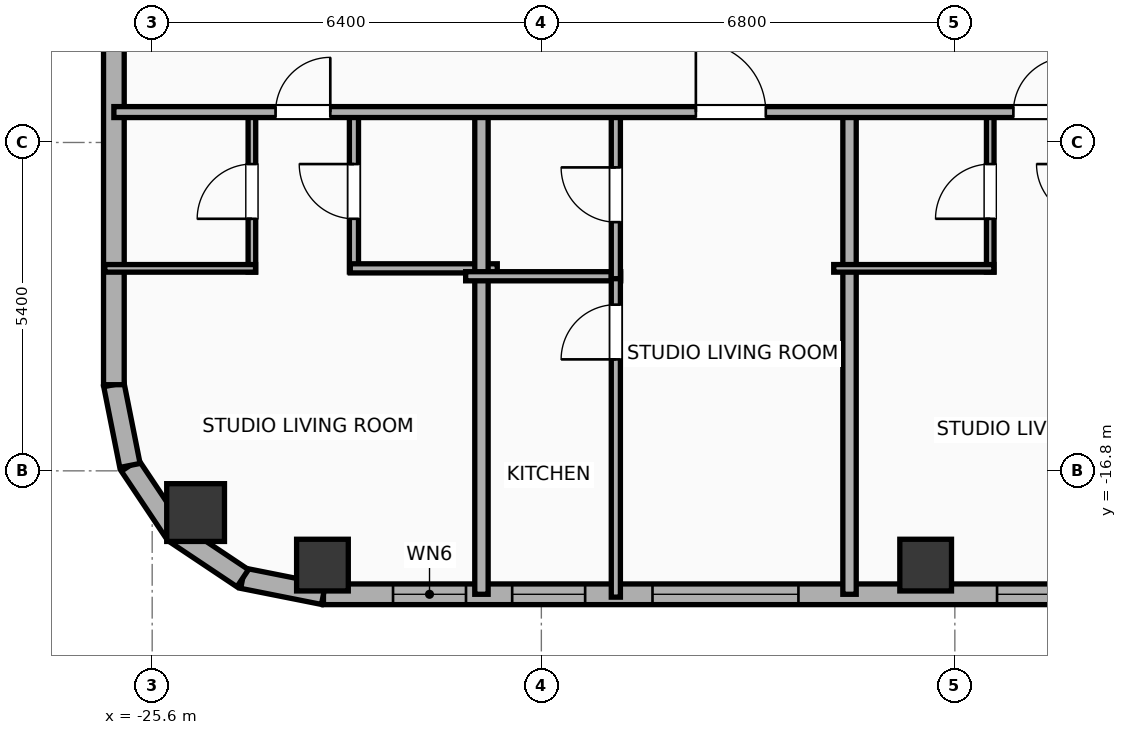
"""IFC4 building model, lengths in metres.
Left out: names, types, materials, properties, quantities, classifications, styles, units other than length and angle.
Written with IfcOpenShell. Run it as: python <this file> out.ifc"""

import sys

from ifc_helpers import new_model, si_unit, direction, frame, frame_2d, origin, origin_2d, place, context, subcontext, project, spatial, rectangle, hollow_rectangle, hollow_circle, extrude, element, fill, save


model = new_model("IFC4")
c1 = context("Model", 3, precision=1e-05, world=origin(), true_north=direction((0.0, 1.0)))
c2 = subcontext(c1, "Body", "Model", "MODEL_VIEW")
j1 = project(units=[si_unit("LENGTHUNIT", "METRE"), si_unit("PLANEANGLEUNIT", "RADIAN")], contexts=[c1])
p1 = place(None, origin())
s1 = spatial("IfcSite", under=j1, at=p1, CompositionType="ELEMENT")
p2 = place(p1, origin())
s2 = spatial("IfcBuilding", under=s1, at=p2, CompositionType="ELEMENT")
p3 = place(p2, frame((0.0, 0.0, 243.1)))
s3 = spatial("IfcBuildingStorey", under=s2, at=p3, CompositionType="ELEMENT", Elevation=243.1)
for number, where, z_axis, x_axis in (
    (1, (-22.8, -18.35, 0.0), (0.0, 0.0, 1.0), (1.0, 0.0, 0.0)),
    (2, (-12.88, -18.35, 0.0), (0.0, 0.0, 1.0), (1.0, 0.0, 0.0)),
):
    element("IfcColumn", number, at=place(p3, frame(where, z_axis=z_axis, x_axis=x_axis)), inside=s3, PredefinedType="COLUMN", context=c2, shape_type="SweptSolid", body=[
        extrude(hollow_rectangle(XDim=0.85, YDim=0.85, WallThickness=0.028, at=origin_2d()), origin(), (0.0, 0.0, 1.0), 3.9),
    ])
p4 = place(p3, frame((-24.886, -17.486, 0.0), z_axis=(0.0, 0.0, 1.0), x_axis=(1.0, 0.0, 0.0)))
e3 = element("IfcColumn", 3, at=p4, inside=s3, PredefinedType="COLUMN", context=c2, shape_type="SweptSolid", body=[
    extrude(hollow_circle(Radius=0.475, WallThickness=0.032, at=origin_2d()), origin(), (0.0, 0.0, 1.0), 3.9),
])
p5 = place(p3, frame((26.783, -18.83, 0.0), z_axis=(0.0, 0.0, 1.0), x_axis=(-1.0, 0.0, 0.0)))
e4 = element("IfcWall", 4, at=p5, inside=s3, PredefinedType="ELEMENTEDWALL", context=c2, shape_type="SweptSolid", body=[
    extrude(rectangle(XDim=49.566, YDim=0.34, at=frame_2d((24.783, 0.0))), origin(), (0.0, 0.0, 1.0), 3.65),
])
p6 = place(p5, frame((23.583, 0.0, 0.75)))
e5 = element("IfcOpeningElement", 5, at=p6, cuts=e4, PredefinedType="OPENING", context=c2, shape_type="SweptSolid", body=[
    extrude(rectangle(XDim=2.4, YDim=2.1, at=frame_2d((1.2, 1.05))), frame((0.0, 0.18, 0.0), z_axis=(0.0, -1.0, 0.0), x_axis=(1.0, 0.0, 0.0)), (0.0, 0.0, 1.0), 0.36),
])
p7 = place(p5, frame((41.756, 0.0, 0.75)))
e6 = element("IfcOpeningElement", 6, at=p7, cuts=e4, PredefinedType="OPENING", context=c2, shape_type="SweptSolid", body=[
    extrude(rectangle(XDim=2.4, YDim=2.1, at=frame_2d((1.2, 1.05))), frame((0.0, 0.18, 0.0), z_axis=(0.0, -1.0, 0.0), x_axis=(1.0, 0.0, 0.0)), (0.0, 0.0, 1.0), 0.36),
])
p8 = place(p5, frame((47.222, 0.0, 0.75)))
e7 = element("IfcOpeningElement", 7, at=p8, cuts=e4, PredefinedType="OPENING", context=c2, shape_type="SweptSolid", body=[
    extrude(rectangle(XDim=1.2, YDim=2.05, at=frame_2d((0.6, 1.025))), frame((0.0, 0.18, 0.0), z_axis=(0.0, -1.0, 0.0), x_axis=(1.0, 0.0, 0.0)), (0.0, 0.0, 1.0), 0.36),
])
p9 = place(p5, frame((45.263, 0.0, 0.75)))
e8 = element("IfcOpeningElement", 8, at=p9, cuts=e4, PredefinedType="OPENING", context=c2, shape_type="SweptSolid", body=[
    extrude(rectangle(XDim=1.2, YDim=2.05, at=frame_2d((0.6, 1.025))), frame((0.0, 0.18, 0.0), z_axis=(0.0, -1.0, 0.0), x_axis=(1.0, 0.0, 0.0)), (0.0, 0.0, 1.0), 0.36),
])
p10 = place(p5, frame((37.289, 0.0, 0.75)))
e9 = element("IfcOpeningElement", 9, at=p10, cuts=e4, PredefinedType="OPENING", context=c2, shape_type="SweptSolid", body=[
    extrude(rectangle(XDim=1.2, YDim=2.05, at=frame_2d((0.6, 1.025))), frame((0.0, 0.18, 0.0), z_axis=(0.0, -1.0, 0.0), x_axis=(1.0, 0.0, 0.0)), (0.0, 0.0, 1.0), 0.36),
])
p11 = place(p5, frame((16.115, 0.0, 0.75)))
e10 = element("IfcOpeningElement", 10, at=p11, cuts=e4, PredefinedType="OPENING", context=c2, shape_type="SweptSolid", body=[
    extrude(rectangle(XDim=1.2, YDim=2.05, at=frame_2d((0.6, 1.025))), frame((0.0, 0.18, 0.0), z_axis=(0.0, -1.0, 0.0), x_axis=(1.0, 0.0, 0.0)), (0.0, 0.0, 1.0), 0.36),
])
p12 = place(p5, frame((12.422, 0.0, 0.75)))
e11 = element("IfcOpeningElement", 11, at=p12, cuts=e4, PredefinedType="OPENING", context=c2, shape_type="SweptSolid", body=[
    extrude(rectangle(XDim=1.2, YDim=2.05, at=frame_2d((0.6, 1.025))), frame((0.0, 0.18, 0.0), z_axis=(0.0, -1.0, 0.0), x_axis=(1.0, 0.0, 0.0)), (0.0, 0.0, 1.0), 0.36),
])
p13 = place(p5, frame((8.01, 0.0, 0.75)))
e12 = element("IfcOpeningElement", 12, at=p13, cuts=e4, PredefinedType="OPENING", context=c2, shape_type="SweptSolid", body=[
    extrude(rectangle(XDim=1.2, YDim=2.05, at=frame_2d((0.6, 1.025))), frame((0.0, 0.18, 0.0), z_axis=(0.0, -1.0, 0.0), x_axis=(1.0, 0.0, 0.0)), (0.0, 0.0, 1.0), 0.36),
])
p14 = place(p5, frame((5.037, 0.0, 0.75)))
e13 = element("IfcOpeningElement", 13, at=p14, cuts=e4, PredefinedType="OPENING", context=c2, shape_type="SweptSolid", body=[
    extrude(rectangle(XDim=1.2, YDim=2.05, at=frame_2d((0.6, 1.025))), frame((0.0, 0.18, 0.0), z_axis=(0.0, -1.0, 0.0), x_axis=(1.0, 0.0, 0.0)), (0.0, 0.0, 1.0), 0.36),
])
p15 = place(p5, frame((1.811, 0.0, 0.75)))
e14 = element("IfcOpeningElement", 14, at=p15, cuts=e4, PredefinedType="OPENING", context=c2, shape_type="SweptSolid", body=[
    extrude(rectangle(XDim=1.2, YDim=2.05, at=frame_2d((0.6, 1.025))), frame((0.0, 0.18, 0.0), z_axis=(0.0, -1.0, 0.0), x_axis=(1.0, 0.0, 0.0)), (0.0, 0.0, 1.0), 0.36),
])
p16 = place(p5, frame((32.253, 0.0, 0.75)))
e15 = element("IfcOpeningElement", 15, at=p16, cuts=e4, PredefinedType="OPENING", context=c2, shape_type="SweptSolid", body=[
    extrude(rectangle(XDim=1.2, YDim=2.05, at=frame_2d((0.6, 1.025))), frame((0.0, 0.18, 0.0), z_axis=(0.0, -1.0, 0.0), x_axis=(1.0, 0.0, 0.0)), (0.0, 0.0, 1.0), 0.36),
])
p17 = place(p5, frame((27.853, 0.0, 0.75)))
e16 = element("IfcOpeningElement", 16, at=p17, cuts=e4, PredefinedType="OPENING", context=c2, shape_type="SweptSolid", body=[
    extrude(rectangle(XDim=1.2, YDim=2.05, at=frame_2d((0.6, 1.025))), frame((0.0, 0.18, 0.0), z_axis=(0.0, -1.0, 0.0), x_axis=(1.0, 0.0, 0.0)), (0.0, 0.0, 1.0), 0.36),
])
p18 = place(p5, frame((20.473, 0.0, 0.75)))
e17 = element("IfcOpeningElement", 17, at=p18, cuts=e4, PredefinedType="OPENING", context=c2, shape_type="SweptSolid", body=[
    extrude(rectangle(XDim=1.2, YDim=2.05, at=frame_2d((0.6, 1.025))), frame((0.0, 0.18, 0.0), z_axis=(0.0, -1.0, 0.0), x_axis=(1.0, 0.0, 0.0)), (0.0, 0.0, 1.0), 0.36),
])
p19 = place(p3, frame((-22.783, -18.83, 0.0), z_axis=(0.0, 0.0, 1.0), x_axis=(-0.980788153188, 0.195075878998, 0.0)))
e18 = element("IfcWall", 18, at=p19, inside=s3, PredefinedType="ELEMENTEDWALL", context=c2, shape_type="SweptSolid", body=[
    extrude(rectangle(XDim=1.354, YDim=0.34, at=frame_2d((0.677, 0.0))), origin(), (0.0, 0.0, 1.0), 3.65),
])
p20 = place(p3, frame((-24.111, -18.566, 0.0), z_axis=(0.0, 0.0, 1.0), x_axis=(-0.831403586725, 0.555669034571, 0.0)))
e19 = element("IfcWall", 19, at=p20, inside=s3, PredefinedType="ELEMENTEDWALL", context=c2, shape_type="SweptSolid", body=[
    extrude(rectangle(XDim=1.337, YDim=0.34, at=frame_2d((0.668, 0.0))), origin(), (0.0, 0.0, 1.0), 3.65),
])
p21 = place(p3, frame((-25.223, -17.823, 0.0), z_axis=(0.0, 0.0, 1.0), x_axis=(-0.555584683399, 0.831459956686, 0.0)))
e20 = element("IfcWall", 20, at=p21, inside=s3, PredefinedType="ELEMENTEDWALL", context=c2, shape_type="SweptSolid", body=[
    extrude(rectangle(XDim=1.337, YDim=0.34, at=frame_2d((0.668, 0.0))), origin(), (0.0, 0.0, 1.0), 3.65),
])
p22 = place(p3, frame((-25.966, -16.711, 0.0), z_axis=(0.0, 0.0, 1.0), x_axis=(-0.195110379894, 0.98078129043, 0.0)))
e21 = element("IfcWall", 21, at=p22, inside=s3, PredefinedType="ELEMENTEDWALL", context=c2, shape_type="SweptSolid", body=[
    extrude(rectangle(XDim=1.354, YDim=0.34, at=frame_2d((0.677, 0.0))), origin(), (0.0, 0.0, 1.0), 3.65),
])
p23 = place(p3, frame((-26.23, -15.383, 0.0), z_axis=(0.0, 0.0, 1.0), x_axis=(0.0, 1.0, 0.0)))
e22 = element("IfcWall", 22, at=p23, inside=s3, PredefinedType="ELEMENTEDWALL", context=c2, shape_type="SweptSolid", body=[
    extrude(rectangle(XDim=31.967, YDim=0.34, at=frame_2d((15.983, 0.0))), origin(), (0.0, 0.0, 1.0), 3.65),
])
p24 = place(p23, frame((29.36, 0.0, 0.75)))
e23 = element("IfcOpeningElement", 23, at=p24, cuts=e22, PredefinedType="OPENING", context=c2, shape_type="SweptSolid", body=[
    extrude(rectangle(XDim=1.2, YDim=2.05, at=frame_2d((0.6, 1.025))), frame((0.0, 0.18, 0.0), z_axis=(0.0, -1.0, 0.0), x_axis=(1.0, 0.0, 0.0)), (0.0, 0.0, 1.0), 0.36),
])
p25 = place(p23, frame((20.828, 0.0, 0.75)))
e24 = element("IfcOpeningElement", 24, at=p25, cuts=e22, PredefinedType="OPENING", context=c2, shape_type="SweptSolid", body=[
    extrude(rectangle(XDim=1.2, YDim=2.05, at=frame_2d((0.6, 1.025))), frame((0.0, 0.18, 0.0), z_axis=(0.0, -1.0, 0.0), x_axis=(1.0, 0.0, 0.0)), (0.0, 0.0, 1.0), 0.36),
])
p26 = place(p23, frame((7.273, 0.0, 0.75)))
e25 = element("IfcOpeningElement", 25, at=p26, cuts=e22, PredefinedType="OPENING", context=c2, shape_type="SweptSolid", body=[
    extrude(rectangle(XDim=1.2, YDim=2.05, at=frame_2d((0.6, 1.025))), frame((0.0, 0.18, 0.0), z_axis=(0.0, -1.0, 0.0), x_axis=(1.0, 0.0, 0.0)), (0.0, 0.0, 1.0), 0.36),
])
p27 = place(p3, frame((-23.96, -13.53, 0.0), z_axis=(0.0, 0.0, 1.0), x_axis=(0.0, 1.0, 0.0)))
e26 = element("IfcWall", 26, at=p27, inside=s3, PredefinedType="PARTITIONING", context=c2, shape_type="SweptSolid", body=[
    extrude(rectangle(XDim=2.65, YDim=0.125, at=frame_2d((1.325, 0.0))), origin(), (0.0, 0.0, 1.0), 3.65),
])
p28 = place(p27, frame((0.875, 0.0, 0.0)))
e27 = element("IfcOpeningElement", 27, at=p28, cuts=e26, PredefinedType="OPENING", context=c2, shape_type="SweptSolid", body=[
    extrude(rectangle(XDim=0.9, YDim=2.05, at=frame_2d((0.45, 1.025))), frame((0.0, 0.073, 0.0), z_axis=(0.0, -1.0, 0.0), x_axis=(1.0, 0.0, 0.0)), (0.0, 0.0, 1.0), 0.145),
])
p29 = place(p3, frame((-22.282, -13.53, 0.0), z_axis=(0.0, 0.0, 1.0), x_axis=(0.0, 1.0, 0.0)))
e28 = element("IfcWall", 28, at=p29, inside=s3, PredefinedType="PLUMBINGWALL", context=c2, shape_type="SweptSolid", body=[
    extrude(rectangle(XDim=2.65, YDim=0.15, at=frame_2d((1.325, 0.0))), origin(), (0.0, 0.0, 1.0), 3.65),
])
p30 = place(p29, frame((0.875, 0.0, 0.0)))
e29 = element("IfcOpeningElement", 29, at=p30, cuts=e28, PredefinedType="OPENING", context=c2, shape_type="SweptSolid", body=[
    extrude(rectangle(XDim=0.9, YDim=2.05, at=frame_2d((0.45, 1.025))), frame((0.0, 0.085, 0.0), z_axis=(0.0, -1.0, 0.0), x_axis=(1.0, 0.0, 0.0)), (0.0, 0.0, 1.0), 0.17),
])
p31 = place(p3, frame((-26.38, -13.47, 0.0), z_axis=(0.0, 0.0, 1.0), x_axis=(1.0, 0.0, 0.0)))
e30 = element("IfcWall", 30, at=p31, inside=s3, PredefinedType="PARTITIONING", context=c2, shape_type="SweptSolid", body=[
    extrude(rectangle(XDim=2.48, YDim=0.125, at=frame_2d((1.24, 0.0))), origin(), (0.0, 0.0, 1.0), 3.65),
])
p32 = place(p3, frame((-22.342, -13.47, 0.0), z_axis=(0.0, 0.0, 1.0), x_axis=(1.0, 0.0, 0.0)))
e31 = element("IfcWall", 31, at=p32, inside=s3, PredefinedType="PLUMBINGWALL", context=c2, shape_type="SweptSolid", body=[
    extrude(rectangle(XDim=2.417, YDim=0.15, at=frame_2d((1.208, 0.0))), origin(), (0.0, 0.0, 1.0), 3.65),
])
p33 = place(p3, frame((-20.185, -18.83, 0.0), z_axis=(0.0, 0.0, 1.0), x_axis=(0.0, 1.0, 0.0)))
e32 = element("IfcWall", 32, at=p33, inside=s3, PredefinedType="PARTITIONING", context=c2, shape_type="SweptSolid", body=[
    extrude(rectangle(XDim=8.01, YDim=0.22, at=frame_2d((4.005, 0.0))), origin(), (0.0, 0.0, 1.0), 3.65),
])
p34 = place(p3, frame((-20.445, -13.6, 0.0), z_axis=(0.0, 0.0, 1.0), x_axis=(1.0, 0.0, 0.0)))
e33 = element("IfcWall", 33, at=p34, inside=s3, PredefinedType="PLUMBINGWALL", context=c2, shape_type="SweptSolid", body=[
    extrude(rectangle(XDim=2.55, YDim=0.15, at=frame_2d((1.275, 0.0))), origin(), (0.0, 0.0, 1.0), 3.65),
])
p35 = place(p3, frame((-17.975, -18.877, 0.0), z_axis=(0.0, 0.0, 1.0), x_axis=(0.0, 1.0, 0.0)))
e34 = element("IfcWall", 34, at=p35, inside=s3, PredefinedType="PLUMBINGWALL", context=c2, shape_type="SweptSolid", body=[
    extrude(rectangle(XDim=5.317, YDim=0.15, at=frame_2d((2.658, 0.0))), origin(), (0.0, 0.0, 1.0), 3.65),
])
p36 = place(p35, frame((3.91, 0.0, 0.0)))
e35 = element("IfcOpeningElement", 35, at=p36, cuts=e34, PredefinedType="OPENING", context=c2, shape_type="SweptSolid", body=[
    extrude(rectangle(XDim=0.9, YDim=2.05, at=frame_2d((0.45, 1.025))), frame((0.0, 0.085, 0.0), z_axis=(0.0, -1.0, 0.0), x_axis=(1.0, 0.0, 0.0)), (0.0, 0.0, 1.0), 0.17),
])
p37 = place(p3, frame((-17.975, -13.64, 0.0), z_axis=(0.0, 0.0, 1.0), x_axis=(0.0, 1.0, 0.0)))
e36 = element("IfcWall", 36, at=p37, inside=s3, PredefinedType="PLUMBINGWALL", context=c2, shape_type="SweptSolid", body=[
    extrude(rectangle(XDim=2.76, YDim=0.15, at=frame_2d((1.38, 0.0))), origin(), (0.0, 0.0, 1.0), 3.65),
])
p38 = place(p37, frame((0.93, 0.0, 0.0)))
e37 = element("IfcOpeningElement", 37, at=p38, cuts=e36, PredefinedType="OPENING", context=c2, shape_type="SweptSolid", body=[
    extrude(rectangle(XDim=0.9, YDim=2.05, at=frame_2d((0.45, 1.025))), frame((0.0, 0.085, 0.0), z_axis=(0.0, -1.0, 0.0), x_axis=(1.0, 0.0, 0.0)), (0.0, 0.0, 1.0), 0.17),
])
p39 = place(p3, frame((-14.132, -18.83, 0.0), z_axis=(0.0, 0.0, 1.0), x_axis=(0.0, 1.0, 0.0)))
e38 = element("IfcWall", 38, at=p39, inside=s3, PredefinedType="PARTITIONING", context=c2, shape_type="SweptSolid", body=[
    extrude(rectangle(XDim=8.01, YDim=0.22, at=frame_2d((4.005, 0.0))), origin(), (0.0, 0.0, 1.0), 3.65),
])
p40 = place(p3, frame((-11.818, -13.53, 0.0), z_axis=(0.0, 0.0, 1.0), x_axis=(0.0, 1.0, 0.0)))
e39 = element("IfcWall", 39, at=p40, inside=s3, PredefinedType="PARTITIONING", context=c2, shape_type="SweptSolid", body=[
    extrude(rectangle(XDim=2.65, YDim=0.125, at=frame_2d((1.325, 0.0))), origin(), (0.0, 0.0, 1.0), 3.65),
])
p41 = place(p40, frame((0.875, 0.0, 0.0)))
e40 = element("IfcOpeningElement", 40, at=p41, cuts=e39, PredefinedType="OPENING", context=c2, shape_type="SweptSolid", body=[
    extrude(rectangle(XDim=0.9, YDim=2.05, at=frame_2d((0.45, 1.025))), frame((0.0, 0.073, 0.0), z_axis=(0.0, -1.0, 0.0), x_axis=(1.0, 0.0, 0.0)), (0.0, 0.0, 1.0), 0.145),
])
p42 = place(p3, frame((-14.392, -13.47, 0.0), z_axis=(0.0, 0.0, 1.0), x_axis=(1.0, 0.0, 0.0)))
e41 = element("IfcWall", 41, at=p42, inside=s3, PredefinedType="PARTITIONING", context=c2, shape_type="SweptSolid", body=[
    extrude(rectangle(XDim=2.634, YDim=0.125, at=frame_2d((1.317, 0.0))), origin(), (0.0, 0.0, 1.0), 3.65),
])
p43 = place(p3, frame((-26.23, -10.9, 0.0), z_axis=(0.0, 0.0, 1.0), x_axis=(1.0, 0.0, 0.0)))
e42 = element("IfcWall", 42, at=p43, inside=s3, PredefinedType="PARTITIONING", context=c2, shape_type="SweptSolid", body=[
    extrude(rectangle(XDim=18.15, YDim=0.18, at=frame_2d((9.075, 0.0))), origin(), (0.0, 0.0, 1.0), 3.65),
])
p44 = place(p43, frame((2.659, 0.0, 0.0)))
e43 = element("IfcOpeningElement", 43, at=p44, cuts=e42, PredefinedType="OPENING", context=c2, shape_type="SweptSolid", body=[
    extrude(rectangle(XDim=0.9, YDim=2.05, at=frame_2d((0.45, 1.025))), frame((0.0, 0.1, 0.0), z_axis=(0.0, -1.0, 0.0), x_axis=(1.0, 0.0, 0.0)), (0.0, 0.0, 1.0), 0.2),
])
p45 = place(p43, frame((9.571, 0.0, 0.0)))
e44 = element("IfcOpeningElement", 44, at=p45, cuts=e42, PredefinedType="OPENING", context=c2, shape_type="SweptSolid", body=[
    extrude(rectangle(XDim=1.15, YDim=2.05, at=frame_2d((0.575, 1.025))), frame((0.0, 0.1, 0.0), z_axis=(0.0, -1.0, 0.0), x_axis=(1.0, 0.0, 0.0)), (0.0, 0.0, 1.0), 0.2),
])
p46 = place(p43, frame((14.792, 0.0, 0.0)))
e45 = element("IfcOpeningElement", 45, at=p46, cuts=e42, PredefinedType="OPENING", context=c2, shape_type="SweptSolid", body=[
    extrude(rectangle(XDim=0.9, YDim=2.05, at=frame_2d((0.45, 1.025))), frame((0.0, 0.1, 0.0), z_axis=(0.0, -1.0, 0.0), x_axis=(1.0, 0.0, 0.0)), (0.0, 0.0, 1.0), 0.2),
])
p47 = place(p7, origin())
e46 = element("IfcWindow", 46, at=p47, inside=s3, PartitioningType="SINGLE_PANEL", PredefinedType="WINDOW", context=c2, shape_type="SweptSolid", body=[
    extrude(rectangle(XDim=2.4, YDim=2.1, at=frame_2d((1.2, 1.05))), frame((0.0, 0.03, 0.0), z_axis=(0.0, -1.0, 0.0), x_axis=(1.0, 0.0, 0.0)), (0.0, 0.0, 1.0), 0.06),
])
fill(e6, e46)
p48 = place(p8, origin())
e47 = element("IfcWindow", 47, at=p48, inside=s3, PartitioningType="SINGLE_PANEL", PredefinedType="WINDOW", context=c2, shape_type="SweptSolid", body=[
    extrude(rectangle(XDim=1.2, YDim=2.05, at=frame_2d((0.6, 1.025))), frame((0.0, 0.03, 0.0), z_axis=(0.0, -1.0, 0.0), x_axis=(1.0, 0.0, 0.0)), (0.0, 0.0, 1.0), 0.06),
])
fill(e7, e47)
p49 = place(p9, origin())
e48 = element("IfcWindow", 48, at=p49, inside=s3, PartitioningType="SINGLE_PANEL", PredefinedType="WINDOW", context=c2, shape_type="SweptSolid", body=[
    extrude(rectangle(XDim=1.2, YDim=2.05, at=frame_2d((0.6, 1.025))), frame((0.0, 0.03, 0.0), z_axis=(0.0, -1.0, 0.0), x_axis=(1.0, 0.0, 0.0)), (0.0, 0.0, 1.0), 0.06),
])
fill(e8, e48)
p50 = place(p10, origin())
e49 = element("IfcWindow", 49, at=p50, inside=s3, PartitioningType="SINGLE_PANEL", PredefinedType="WINDOW", context=c2, shape_type="SweptSolid", body=[
    extrude(rectangle(XDim=1.2, YDim=2.05, at=frame_2d((0.6, 1.025))), frame((0.0, 0.03, 0.0), z_axis=(0.0, -1.0, 0.0), x_axis=(1.0, 0.0, 0.0)), (0.0, 0.0, 1.0), 0.06),
])
fill(e9, e49)
p51 = place(p28, origin())
e50 = element("IfcDoor", 50, at=p51, inside=s3, OperationType="SINGLE_SWING_LEFT", PredefinedType="DOOR", context=c2, shape_type="SweptSolid", body=[
    extrude(rectangle(XDim=0.9, YDim=2.05, at=frame_2d((0.45, 1.025))), frame((0.0, 0.025, 0.0), z_axis=(0.0, -1.0, 0.0), x_axis=(1.0, 0.0, 0.0)), (0.0, 0.0, 1.0), 0.05),
])
fill(e27, e50)
p52 = place(p30, origin())
e51 = element("IfcDoor", 51, at=p52, inside=s3, OperationType="SINGLE_SWING_RIGHT", PredefinedType="DOOR", context=c2, shape_type="SweptSolid", body=[
    extrude(rectangle(XDim=0.9, YDim=2.05, at=frame_2d((0.45, 1.025))), frame((0.0, 0.025, 0.0), z_axis=(0.0, -1.0, 0.0), x_axis=(1.0, 0.0, 0.0)), (0.0, 0.0, 1.0), 0.05),
])
fill(e29, e51)
p53 = place(p36, origin())
e52 = element("IfcDoor", 52, at=p53, inside=s3, OperationType="SINGLE_SWING_LEFT", PredefinedType="DOOR", context=c2, shape_type="SweptSolid", body=[
    extrude(rectangle(XDim=0.9, YDim=2.05, at=frame_2d((0.45, 1.025))), frame((0.0, 0.025, 0.0), z_axis=(0.0, -1.0, 0.0), x_axis=(1.0, 0.0, 0.0)), (0.0, 0.0, 1.0), 0.05),
])
fill(e35, e52)
p54 = place(p38, origin())
e53 = element("IfcDoor", 53, at=p54, inside=s3, OperationType="SINGLE_SWING_RIGHT", PredefinedType="DOOR", context=c2, shape_type="SweptSolid", body=[
    extrude(rectangle(XDim=0.9, YDim=2.05, at=frame_2d((0.45, 1.025))), frame((0.0, 0.025, 0.0), z_axis=(0.0, -1.0, 0.0), x_axis=(1.0, 0.0, 0.0)), (0.0, 0.0, 1.0), 0.05),
])
fill(e37, e53)
p55 = place(p41, origin())
e54 = element("IfcDoor", 54, at=p55, inside=s3, OperationType="SINGLE_SWING_LEFT", PredefinedType="DOOR", context=c2, shape_type="SweptSolid", body=[
    extrude(rectangle(XDim=0.9, YDim=2.05, at=frame_2d((0.45, 1.025))), frame((0.0, 0.025, 0.0), z_axis=(0.0, -1.0, 0.0), x_axis=(1.0, 0.0, 0.0)), (0.0, 0.0, 1.0), 0.05),
])
fill(e40, e54)
p56 = place(p44, origin())
e55 = element("IfcDoor", 55, at=p56, inside=s3, OperationType="SINGLE_SWING_RIGHT", PredefinedType="DOOR", context=c2, shape_type="SweptSolid", body=[
    extrude(rectangle(XDim=0.9, YDim=2.05, at=frame_2d((0.45, 1.025))), frame((0.0, 0.025, 0.0), z_axis=(0.0, -1.0, 0.0), x_axis=(1.0, 0.0, 0.0)), (0.0, 0.0, 1.0), 0.05),
])
fill(e43, e55)
p57 = place(p45, origin())
e56 = element("IfcDoor", 56, at=p57, inside=s3, OperationType="SINGLE_SWING_LEFT", PredefinedType="DOOR", context=c2, shape_type="SweptSolid", body=[
    extrude(rectangle(XDim=1.15, YDim=2.05, at=frame_2d((0.575, 1.025))), frame((0.0, 0.025, 0.0), z_axis=(0.0, -1.0, 0.0), x_axis=(1.0, 0.0, 0.0)), (0.0, 0.0, 1.0), 0.05),
])
fill(e44, e56)
p58 = place(p46, origin())
e57 = element("IfcDoor", 57, at=p58, inside=s3, OperationType="SINGLE_SWING_RIGHT", PredefinedType="DOOR", context=c2, shape_type="SweptSolid", body=[
    extrude(rectangle(XDim=0.9, YDim=2.05, at=frame_2d((0.45, 1.025))), frame((0.0, 0.025, 0.0), z_axis=(0.0, -1.0, 0.0), x_axis=(1.0, 0.0, 0.0)), (0.0, 0.0, 1.0), 0.05),
])
fill(e45, e57)
save(model, sys.argv[1])
